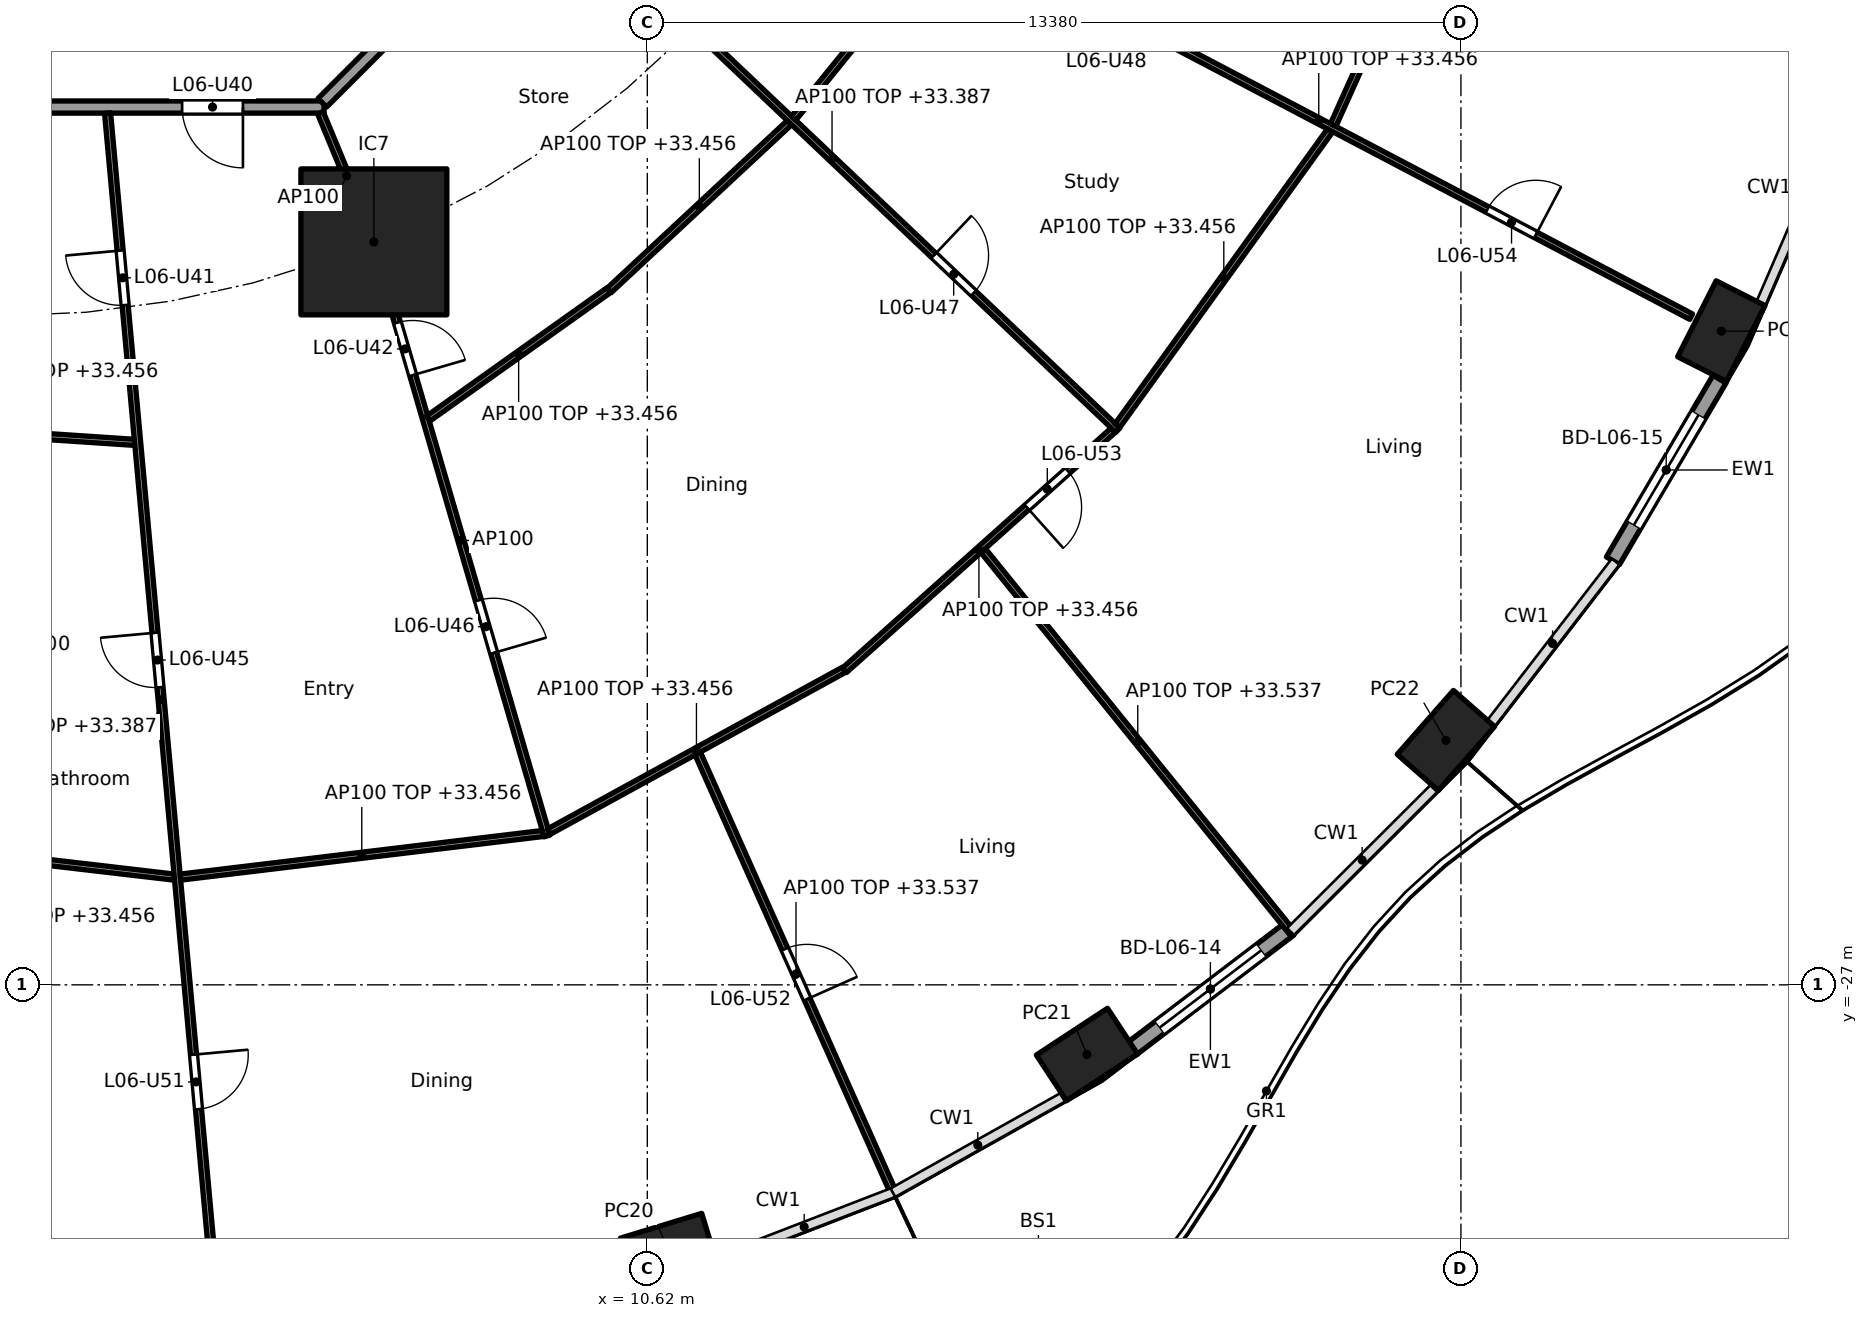
"""IFC4 building model, lengths in metres.
Left out: names, types, materials, properties, quantities, classifications, styles, units other than length and angle.
Written with IfcOpenShell. Run it as: python <this file> out.ifc"""

import sys

from ifc_helpers import new_model, si_unit, direction, frame, frame_2d, origin, origin_2d, place, context, subcontext, project, spatial, rectangle, hollow_rectangle, extrude, element, fill, save


model = new_model("IFC4")
c1 = context("Model", 3, precision=1e-05, world=origin(), true_north=direction((0.0, 1.0)))
c2 = subcontext(c1, "Body", "Model", "MODEL_VIEW")
j1 = project(units=[si_unit("LENGTHUNIT", "METRE"), si_unit("PLANEANGLEUNIT", "RADIAN")], contexts=[c1])
p1 = place(None, origin())
s1 = spatial("IfcSite", under=j1, at=p1, CompositionType="ELEMENT")
p2 = place(p1, origin())
s2 = spatial("IfcBuilding", under=s1, at=p2, CompositionType="ELEMENT")
p3 = place(p2, frame((0.0, 0.0, 30.7)))
s3 = spatial("IfcBuildingStorey", under=s2, at=p3, CompositionType="ELEMENT", Elevation=30.7)
for number, where, z_axis, x_axis in (
    (1, (10.976, -31.393, 0.0), (0.0, 0.0, 1.0), (0.957, 0.292, 0.0)),
    (2, (17.85, -28.146, 0.0), (0.0, 0.0, 1.0), (0.836, 0.549, 0.0)),
    (3, (23.752, -22.981, 0.0), (0.0, 0.0, 1.0), (0.66, 0.751, 0.0)),
    (4, (28.282, -16.25, 0.0), (0.0, 0.0, 1.0), (0.452, 0.892, 0.0)),
):
    element("IfcColumn", number, at=place(p3, frame(where, z_axis=z_axis, x_axis=x_axis)), inside=s3, PredefinedType="COLUMN", context=c2, shape_type="SweptSolid", body=[
        extrude(hollow_rectangle(XDim=1.4, YDim=0.9, WallThickness=0.05, at=origin_2d()), origin(), (0.0, 0.0, 1.0), 3.7),
    ])
p4 = place(p3, frame((6.123, -14.782, 0.0), z_axis=(0.0, 0.0, 1.0), x_axis=(1.0, 0.0, 0.0)))
e5 = element("IfcColumn", 5, at=p4, inside=s3, PredefinedType="COLUMN", context=c2, shape_type="SweptSolid", body=[
    extrude(rectangle(XDim=2.4, YDim=2.4, at=origin_2d()), origin(), (0.0, 0.0, 1.0), 3.7),
])
p5 = place(p3, frame((21.178, -26.081, 0.0), z_axis=(0.0, 0.0, 1.0), x_axis=(-0.796022293214, -0.605267303517, 0.0)))
e6 = element("IfcWall", 6, at=p5, inside=s3, PredefinedType="SOLIDWALL", context=c2, shape_type="SweptSolid", body=[
    extrude(rectangle(XDim=3.262, YDim=0.25, at=frame_2d((1.631, 0.0))), origin(), (0.0, 0.0, 1.0), 3.44),
])
p6 = place(p5, frame((0.581, 0.0, 0.0)))
e7 = element("IfcOpeningElement", 7, at=p6, cuts=e6, PredefinedType="OPENING", context=c2, shape_type="SweptSolid", body=[
    extrude(rectangle(XDim=2.1, YDim=2.4, at=frame_2d((1.05, 1.2))), frame((0.0, 0.135, 0.0), z_axis=(0.0, -1.0, 0.0), x_axis=(1.0, 0.0, 0.0)), (0.0, 0.0, 1.0), 0.27),
])
p7 = place(p3, frame((28.252, -17.04, 0.0), z_axis=(0.0, 0.0, 1.0), x_axis=(-0.506311160839, -0.862350861546, 0.0)))
e8 = element("IfcWall", 8, at=p7, inside=s3, PredefinedType="SOLIDWALL", context=c2, shape_type="SweptSolid", body=[
    extrude(rectangle(XDim=3.462, YDim=0.25, at=frame_2d((1.731, 0.0))), origin(), (0.0, 0.0, 1.0), 3.44),
])
p8 = place(p7, frame((0.681, 0.0, 0.0)))
e9 = element("IfcOpeningElement", 9, at=p8, cuts=e8, PredefinedType="OPENING", context=c2, shape_type="SweptSolid", body=[
    extrude(rectangle(XDim=2.1, YDim=2.4, at=frame_2d((1.05, 1.2))), frame((0.0, 0.135, 0.0), z_axis=(0.0, -1.0, 0.0), x_axis=(1.0, 0.0, 0.0)), (0.0, 0.0, 1.0), 0.27),
])
p9 = place(p3, frame((-5.104, -12.565, 0.0), z_axis=(0.0, 0.0, 1.0), x_axis=(1.0, 0.0, 0.0)))
e10 = element("IfcWall", 10, at=p9, inside=s3, PredefinedType="PARTITIONING", context=c2, shape_type="SweptSolid", body=[
    extrude(rectangle(XDim=10.409, YDim=0.2, at=frame_2d((5.205, 0.0))), origin(), (0.0, 0.0, 1.0), 3.44),
])
p10 = place(p9, frame((8.074, 0.0, 0.0)))
e11 = element("IfcOpeningElement", 11, at=p10, cuts=e10, PredefinedType="OPENING", context=c2, shape_type="SweptSolid", body=[
    extrude(rectangle(XDim=1.0, YDim=2.1, at=frame_2d((0.5, 1.05))), frame((0.0, 0.11, 0.0), z_axis=(0.0, -1.0, 0.0), x_axis=(1.0, 0.0, 0.0)), (0.0, 0.0, 1.0), 0.22),
])
p11 = place(p3, frame((5.275, -12.494, 0.0), z_axis=(0.0, 0.0, 1.0), x_axis=(0.707106781187, 0.707106781187, 0.0)))
e12 = element("IfcWall", 12, at=p11, inside=s3, PredefinedType="PARTITIONING", context=c2, shape_type="SweptSolid", body=[
    extrude(rectangle(XDim=10.409, YDim=0.2, at=frame_2d((5.205, 0.0))), origin(), (0.0, 0.0, 1.0), 3.44),
])
p12 = place(p3, frame((-2.271, -17.782, 0.0), z_axis=(0.0, 0.0, 1.0), x_axis=(0.997791437766, -0.066424744789, 0.0)))
e13 = element("IfcWall", 13, at=p12, inside=s3, PredefinedType="PARTITIONING", context=c2, shape_type="SweptSolid", body=[
    extrude(rectangle(XDim=4.469, YDim=0.1, at=frame_2d((2.235, 0.0))), origin(), (0.0, 0.0, 1.0), 2.756),
])
p13 = place(p3, frame((-3.031, -24.543, 0.0), z_axis=(0.0, 0.0, 1.0), x_axis=(0.993255612046, -0.115945198862, 0.0)))
e14 = element("IfcWall", 14, at=p13, inside=s3, PredefinedType="PARTITIONING", context=c2, shape_type="SweptSolid", body=[
    extrude(rectangle(XDim=5.913, YDim=0.1, at=frame_2d((2.956, 0.0))), origin(), (0.0, 0.0, 1.0), 2.756),
])
p14 = place(p13, frame((1.028, 0.0, 0.0)))
e15 = element("IfcOpeningElement", 15, at=p14, cuts=e14, PredefinedType="OPENING", context=c2, shape_type="SweptSolid", body=[
    extrude(rectangle(XDim=0.9, YDim=2.1, at=frame_2d((0.45, 1.05))), frame((0.0, 0.06, 0.0), z_axis=(0.0, -1.0, 0.0), x_axis=(1.0, 0.0, 0.0)), (0.0, 0.0, 1.0), 0.12),
])
p15 = place(p3, frame((1.744, -12.664, 0.0), z_axis=(0.0, 0.0, 1.0), x_axis=(0.090893639596, -0.995860605849, 0.0)))
e16 = element("IfcWall", 16, at=p15, inside=s3, PredefinedType="PARTITIONING", context=c2, shape_type="SweptSolid", body=[
    extrude(rectangle(XDim=19.374, YDim=0.1, at=frame_2d((9.687, 0.0))), origin(), (0.0, 0.0, 1.0), 2.687),
])
p16 = place(p15, frame((2.27, 0.0, 0.0)))
e17 = element("IfcOpeningElement", 17, at=p16, cuts=e16, PredefinedType="OPENING", context=c2, shape_type="SweptSolid", body=[
    extrude(rectangle(XDim=0.9, YDim=2.1, at=frame_2d((0.45, 1.05))), frame((0.0, 0.06, 0.0), z_axis=(0.0, -1.0, 0.0), x_axis=(1.0, 0.0, 0.0)), (0.0, 0.0, 1.0), 0.12),
])
p17 = place(p15, frame((8.582, 0.0, 0.0)))
e18 = element("IfcOpeningElement", 18, at=p17, cuts=e16, PredefinedType="OPENING", context=c2, shape_type="SweptSolid", body=[
    extrude(rectangle(XDim=0.9, YDim=2.1, at=frame_2d((0.45, 1.05))), frame((0.0, 0.06, 0.0), z_axis=(0.0, -1.0, 0.0), x_axis=(1.0, 0.0, 0.0)), (0.0, 0.0, 1.0), 0.12),
])
p18 = place(p15, frame((15.548, 0.0, 0.0)))
e19 = element("IfcOpeningElement", 19, at=p18, cuts=e16, PredefinedType="OPENING", context=c2, shape_type="SweptSolid", body=[
    extrude(rectangle(XDim=0.9, YDim=2.1, at=frame_2d((0.45, 1.05))), frame((0.0, 0.06, 0.0), z_axis=(0.0, -1.0, 0.0), x_axis=(1.0, 0.0, 0.0)), (0.0, 0.0, 1.0), 0.12),
])
p19 = place(p3, frame((2.941, -25.229, 0.0), z_axis=(0.0, 0.0, 1.0), x_axis=(0.992836798252, 0.119478416615, 0.0)))
e20 = element("IfcWall", 20, at=p19, inside=s3, PredefinedType="PARTITIONING", context=c2, shape_type="SweptSolid", body=[
    extrude(rectangle(XDim=6.01, YDim=0.1, at=frame_2d((3.005, 0.0))), origin(), (0.0, 0.0, 1.0), 2.756),
])
p20 = place(p3, frame((5.243, -12.657, 0.0), z_axis=(0.0, 0.0, 1.0), x_axis=(0.382719158442, -0.923864733477, 0.0)))
e21 = element("IfcWall", 21, at=p20, inside=s3, PredefinedType="PARTITIONING", context=c2, shape_type="SweptSolid", body=[
    extrude(rectangle(XDim=2.25, YDim=0.1, at=frame_2d((1.125, 0.0))), origin(), (0.0, 0.0, 1.0), 3.44),
])
p21 = place(p3, frame((6.137, -14.83, 0.0), z_axis=(0.0, 0.0, 1.0), x_axis=(0.279843546189, -0.960045618529, 0.0)))
e22 = element("IfcWall", 22, at=p21, inside=s3, PredefinedType="PARTITIONING", context=c2, shape_type="SweptSolid", body=[
    extrude(rectangle(XDim=10.127, YDim=0.1, at=frame_2d((5.063, 0.0))), origin(), (0.0, 0.0, 1.0), 3.44),
])
p22 = place(p21, frame((1.334, 0.0, 0.0)))
e23 = element("IfcOpeningElement", 23, at=p22, cuts=e22, PredefinedType="OPENING", context=c2, shape_type="SweptSolid", body=[
    extrude(rectangle(XDim=0.9, YDim=2.1, at=frame_2d((0.45, 1.05))), frame((0.0, 0.06, 0.0), z_axis=(0.0, -1.0, 0.0), x_axis=(1.0, 0.0, 0.0)), (0.0, 0.0, 1.0), 0.12),
])
p23 = place(p21, frame((6.091, 0.0, 0.0)))
e24 = element("IfcOpeningElement", 24, at=p23, cuts=e22, PredefinedType="OPENING", context=c2, shape_type="SweptSolid", body=[
    extrude(rectangle(XDim=0.9, YDim=2.1, at=frame_2d((0.45, 1.05))), frame((0.0, 0.06, 0.0), z_axis=(0.0, -1.0, 0.0), x_axis=(1.0, 0.0, 0.0)), (0.0, 0.0, 1.0), 0.12),
])
p24 = place(p3, frame((7.019, -17.686, 0.0), z_axis=(0.0, 0.0, 1.0), x_axis=(0.81494477814, 0.57953861699, 0.0)))
e25 = element("IfcWall", 25, at=p24, inside=s3, PredefinedType="PARTITIONING", context=c2, shape_type="SweptSolid", body=[
    extrude(rectangle(XDim=3.644, YDim=0.1, at=frame_2d((1.822, 0.0))), origin(), (0.0, 0.0, 1.0), 2.756),
])
p25 = place(p3, frame((9.001, -24.48, 0.0), z_axis=(0.0, 0.0, 1.0), x_axis=(0.876794415294, 0.480865421203, 0.0)))
e26 = element("IfcWall", 26, at=p25, inside=s3, PredefinedType="PARTITIONING", context=c2, shape_type="SweptSolid", body=[
    extrude(rectangle(XDim=5.536, YDim=0.1, at=frame_2d((2.768, 0.0))), origin(), (0.0, 0.0, 1.0), 2.756),
])
p26 = place(p3, frame((11.448, -23.195, 0.0), z_axis=(0.0, 0.0, 1.0), x_axis=(0.407016520798, -0.913420796675, 0.0)))
e27 = element("IfcWall", 27, at=p26, inside=s3, PredefinedType="PARTITIONING", context=c2, shape_type="SweptSolid", body=[
    extrude(rectangle(XDim=7.944, YDim=0.1, at=frame_2d((3.972, 0.0))), origin(), (0.0, 0.0, 1.0), 2.837),
])
p27 = place(p26, frame((3.522, 0.0, 0.0)))
e28 = element("IfcOpeningElement", 28, at=p27, cuts=e27, PredefinedType="OPENING", context=c2, shape_type="SweptSolid", body=[
    extrude(rectangle(XDim=0.9, YDim=2.1, at=frame_2d((0.45, 1.05))), frame((0.0, 0.06, 0.0), z_axis=(0.0, -1.0, 0.0), x_axis=(1.0, 0.0, 0.0)), (0.0, 0.0, 1.0), 0.12),
])
p28 = place(p3, frame((9.993, -15.579, 0.0), z_axis=(0.0, 0.0, 1.0), x_axis=(0.732028724098, 0.681273768096, 0.0)))
e29 = element("IfcWall", 29, at=p28, inside=s3, PredefinedType="PARTITIONING", context=c2, shape_type="SweptSolid", body=[
    extrude(rectangle(XDim=4.05, YDim=0.1, at=frame_2d((2.025, 0.0))), origin(), (0.0, 0.0, 1.0), 2.756),
])
p29 = place(p3, frame((13.862, -21.828, 0.0), z_axis=(0.0, 0.0, 1.0), x_axis=(0.745812746724, 0.666155647596, 0.0)))
e30 = element("IfcWall", 30, at=p29, inside=s3, PredefinedType="PARTITIONING", context=c2, shape_type="SweptSolid", body=[
    extrude(rectangle(XDim=5.931, YDim=0.1, at=frame_2d((2.965, 0.0))), origin(), (0.0, 0.0, 1.0), 2.756),
])
p30 = place(p29, frame((4.023, 0.0, 0.0)))
e31 = element("IfcOpeningElement", 31, at=p30, cuts=e30, PredefinedType="OPENING", context=c2, shape_type="SweptSolid", body=[
    extrude(rectangle(XDim=0.9, YDim=2.1, at=frame_2d((0.45, 1.05))), frame((0.0, 0.06, 0.0), z_axis=(0.0, -1.0, 0.0), x_axis=(1.0, 0.0, 0.0)), (0.0, 0.0, 1.0), 0.12),
])
p31 = place(p3, frame((16.142, -19.858, 0.0), z_axis=(0.0, 0.0, 1.0), x_axis=(0.628738066508, -0.777617157555, 0.0)))
e32 = element("IfcWall", 32, at=p31, inside=s3, PredefinedType="PARTITIONING", context=c2, shape_type="SweptSolid", body=[
    extrude(rectangle(XDim=8.091, YDim=0.1, at=frame_2d((4.045, 0.0))), origin(), (0.0, 0.0, 1.0), 2.837),
])
p32 = place(p3, frame((8.957, -8.953, 0.0), z_axis=(0.0, 0.0, 1.0), x_axis=(0.725250022034, -0.688485588476, 0.0)))
e33 = element("IfcWall", 33, at=p32, inside=s3, PredefinedType="PARTITIONING", context=c2, shape_type="SweptSolid", body=[
    extrude(rectangle(XDim=12.963, YDim=0.1, at=frame_2d((6.481, 0.0))), origin(), (0.0, 0.0, 1.0), 2.687),
])
p33 = place(p32, frame((2.333, 0.0, 0.0)))
e34 = element("IfcOpeningElement", 34, at=p33, cuts=e33, PredefinedType="OPENING", context=c2, shape_type="SweptSolid", body=[
    extrude(rectangle(XDim=0.9, YDim=2.1, at=frame_2d((0.45, 1.05))), frame((0.0, 0.06, 0.0), z_axis=(0.0, -1.0, 0.0), x_axis=(1.0, 0.0, 0.0)), (0.0, 0.0, 1.0), 0.12),
])
p34 = place(p32, frame((8.79, 0.0, 0.0)))
e35 = element("IfcOpeningElement", 35, at=p34, cuts=e33, PredefinedType="OPENING", context=c2, shape_type="SweptSolid", body=[
    extrude(rectangle(XDim=0.9, YDim=2.1, at=frame_2d((0.45, 1.05))), frame((0.0, 0.06, 0.0), z_axis=(0.0, -1.0, 0.0), x_axis=(1.0, 0.0, 0.0)), (0.0, 0.0, 1.0), 0.12),
])
p35 = place(p3, frame((13.026, -12.747, 0.0), z_axis=(0.0, 0.0, 1.0), x_axis=(0.630126826288, 0.776492229705, 0.0)))
e36 = element("IfcWall", 36, at=p35, inside=s3, PredefinedType="PARTITIONING", context=c2, shape_type="SweptSolid", body=[
    extrude(rectangle(XDim=4.007, YDim=0.1, at=frame_2d((2.003, 0.0))), origin(), (0.0, 0.0, 1.0), 2.756),
])
p36 = place(p3, frame((18.351, -17.803, 0.0), z_axis=(0.0, 0.0, 1.0), x_axis=(0.584563700282, 0.811347817099, 0.0)))
e37 = element("IfcWall", 37, at=p36, inside=s3, PredefinedType="PARTITIONING", context=c2, shape_type="SweptSolid", body=[
    extrude(rectangle(XDim=5.984, YDim=0.1, at=frame_2d((2.992, 0.0))), origin(), (0.0, 0.0, 1.0), 2.756),
])
p37 = place(p3, frame((15.538, -9.574, 0.0), z_axis=(0.0, 0.0, 1.0), x_axis=(0.885181406501, -0.465246039838, 0.0)))
e38 = element("IfcWall", 38, at=p37, inside=s3, PredefinedType="PARTITIONING", context=c2, shape_type="SweptSolid", body=[
    extrude(rectangle(XDim=13.837, YDim=0.1, at=frame_2d((6.918, 0.0))), origin(), (0.0, 0.0, 1.0), 2.756),
])
p38 = place(p37, frame((3.156, 0.0, 0.0)))
e39 = element("IfcOpeningElement", 39, at=p38, cuts=e38, PredefinedType="OPENING", context=c2, shape_type="SweptSolid", body=[
    extrude(rectangle(XDim=0.9, YDim=2.1, at=frame_2d((0.45, 1.05))), frame((0.0, 0.06, 0.0), z_axis=(0.0, -1.0, 0.0), x_axis=(1.0, 0.0, 0.0)), (0.0, 0.0, 1.0), 0.12),
])
p39 = place(p37, frame((10.05, 0.0, 0.0)))
e40 = element("IfcOpeningElement", 40, at=p39, cuts=e38, PredefinedType="OPENING", context=c2, shape_type="SweptSolid", body=[
    extrude(rectangle(XDim=0.9, YDim=2.1, at=frame_2d((0.45, 1.05))), frame((0.0, 0.06, 0.0), z_axis=(0.0, -1.0, 0.0), x_axis=(1.0, 0.0, 0.0)), (0.0, 0.0, 1.0), 0.12),
])
p40 = place(p3, frame((21.899, -12.861, 0.0), z_axis=(0.0, 0.0, 1.0), x_axis=(0.410201529109, 0.911994904326, 0.0)))
e41 = element("IfcWall", 41, at=p40, inside=s3, PredefinedType="PARTITIONING", context=c2, shape_type="SweptSolid", body=[
    extrude(rectangle(XDim=5.787, YDim=0.1, at=frame_2d((2.894, 0.0))), origin(), (0.0, 0.0, 1.0), 2.756),
])
p41 = place(p6, origin())
e42 = element("IfcDoor", 42, at=p41, inside=s3, OperationType="SLIDING_TO_LEFT", PredefinedType="DOOR", context=c2, shape_type="SweptSolid", body=[
    extrude(rectangle(XDim=2.1, YDim=2.4, at=frame_2d((1.05, 1.2))), frame((0.0, 0.025, 0.0), z_axis=(0.0, -1.0, 0.0), x_axis=(1.0, 0.0, 0.0)), (0.0, 0.0, 1.0), 0.05),
])
fill(e7, e42)
p42 = place(p8, origin())
e43 = element("IfcDoor", 43, at=p42, inside=s3, OperationType="SLIDING_TO_LEFT", PredefinedType="DOOR", context=c2, shape_type="SweptSolid", body=[
    extrude(rectangle(XDim=2.1, YDim=2.4, at=frame_2d((1.05, 1.2))), frame((0.0, 0.025, 0.0), z_axis=(0.0, -1.0, 0.0), x_axis=(1.0, 0.0, 0.0)), (0.0, 0.0, 1.0), 0.05),
])
fill(e9, e43)
p43 = place(p10, frame((1.0, 0.0, 0.0), x_axis=(-1.0, 0.0, 0.0)))
e44 = element("IfcDoor", 44, at=p43, inside=s3, OperationType="SINGLE_SWING_LEFT", PredefinedType="DOOR", context=c2, shape_type="SweptSolid", body=[
    extrude(rectangle(XDim=1.0, YDim=2.1, at=frame_2d((0.5, 1.05))), frame((0.0, 0.025, 0.0), z_axis=(0.0, -1.0, 0.0), x_axis=(1.0, 0.0, 0.0)), (0.0, 0.0, 1.0), 0.05),
])
fill(e11, e44)
p44 = place(p16, frame((0.9, 0.0, 0.0), x_axis=(-1.0, 0.0, 0.0)))
e45 = element("IfcDoor", 45, at=p44, inside=s3, OperationType="SINGLE_SWING_RIGHT", PredefinedType="DOOR", context=c2, shape_type="SweptSolid", body=[
    extrude(rectangle(XDim=0.9, YDim=2.1, at=frame_2d((0.45, 1.05))), frame((0.0, 0.025, 0.0), z_axis=(0.0, -1.0, 0.0), x_axis=(1.0, 0.0, 0.0)), (0.0, 0.0, 1.0), 0.05),
])
fill(e17, e45)
p45 = place(p22, origin())
e46 = element("IfcDoor", 46, at=p45, inside=s3, OperationType="SINGLE_SWING_RIGHT", PredefinedType="DOOR", context=c2, shape_type="SweptSolid", body=[
    extrude(rectangle(XDim=0.9, YDim=2.1, at=frame_2d((0.45, 1.05))), frame((0.0, 0.025, 0.0), z_axis=(0.0, -1.0, 0.0), x_axis=(1.0, 0.0, 0.0)), (0.0, 0.0, 1.0), 0.05),
])
fill(e23, e46)
p46 = place(p17, frame((0.9, 0.0, 0.0), x_axis=(-1.0, 0.0, 0.0)))
e47 = element("IfcDoor", 47, at=p46, inside=s3, OperationType="SINGLE_SWING_RIGHT", PredefinedType="DOOR", context=c2, shape_type="SweptSolid", body=[
    extrude(rectangle(XDim=0.9, YDim=2.1, at=frame_2d((0.45, 1.05))), frame((0.0, 0.025, 0.0), z_axis=(0.0, -1.0, 0.0), x_axis=(1.0, 0.0, 0.0)), (0.0, 0.0, 1.0), 0.05),
])
fill(e18, e47)
p47 = place(p23, origin())
e48 = element("IfcDoor", 48, at=p47, inside=s3, OperationType="SINGLE_SWING_RIGHT", PredefinedType="DOOR", context=c2, shape_type="SweptSolid", body=[
    extrude(rectangle(XDim=0.9, YDim=2.1, at=frame_2d((0.45, 1.05))), frame((0.0, 0.025, 0.0), z_axis=(0.0, -1.0, 0.0), x_axis=(1.0, 0.0, 0.0)), (0.0, 0.0, 1.0), 0.05),
])
fill(e24, e48)
p48 = place(p34, origin())
e49 = element("IfcDoor", 49, at=p48, inside=s3, OperationType="SINGLE_SWING_LEFT", PredefinedType="DOOR", context=c2, shape_type="SweptSolid", body=[
    extrude(rectangle(XDim=0.9, YDim=2.1, at=frame_2d((0.45, 1.05))), frame((0.0, 0.025, 0.0), z_axis=(0.0, -1.0, 0.0), x_axis=(1.0, 0.0, 0.0)), (0.0, 0.0, 1.0), 0.05),
])
fill(e35, e49)
p49 = place(p18, origin())
e50 = element("IfcDoor", 50, at=p49, inside=s3, OperationType="SINGLE_SWING_LEFT", PredefinedType="DOOR", context=c2, shape_type="SweptSolid", body=[
    extrude(rectangle(XDim=0.9, YDim=2.1, at=frame_2d((0.45, 1.05))), frame((0.0, 0.025, 0.0), z_axis=(0.0, -1.0, 0.0), x_axis=(1.0, 0.0, 0.0)), (0.0, 0.0, 1.0), 0.05),
])
fill(e19, e50)
p50 = place(p27, origin())
e51 = element("IfcDoor", 51, at=p50, inside=s3, OperationType="SINGLE_SWING_RIGHT", PredefinedType="DOOR", context=c2, shape_type="SweptSolid", body=[
    extrude(rectangle(XDim=0.9, YDim=2.1, at=frame_2d((0.45, 1.05))), frame((0.0, 0.025, 0.0), z_axis=(0.0, -1.0, 0.0), x_axis=(1.0, 0.0, 0.0)), (0.0, 0.0, 1.0), 0.05),
])
fill(e28, e51)
p51 = place(p30, frame((0.9, 0.0, 0.0), x_axis=(-1.0, 0.0, 0.0)))
e52 = element("IfcDoor", 52, at=p51, inside=s3, OperationType="SINGLE_SWING_RIGHT", PredefinedType="DOOR", context=c2, shape_type="SweptSolid", body=[
    extrude(rectangle(XDim=0.9, YDim=2.1, at=frame_2d((0.45, 1.05))), frame((0.0, 0.025, 0.0), z_axis=(0.0, -1.0, 0.0), x_axis=(1.0, 0.0, 0.0)), (0.0, 0.0, 1.0), 0.05),
])
fill(e31, e52)
p52 = place(p39, origin())
e53 = element("IfcDoor", 53, at=p52, inside=s3, OperationType="SINGLE_SWING_RIGHT", PredefinedType="DOOR", context=c2, shape_type="SweptSolid", body=[
    extrude(rectangle(XDim=0.9, YDim=2.1, at=frame_2d((0.45, 1.05))), frame((0.0, 0.025, 0.0), z_axis=(0.0, -1.0, 0.0), x_axis=(1.0, 0.0, 0.0)), (0.0, 0.0, 1.0), 0.05),
])
fill(e40, e53)
save(model, sys.argv[1])
